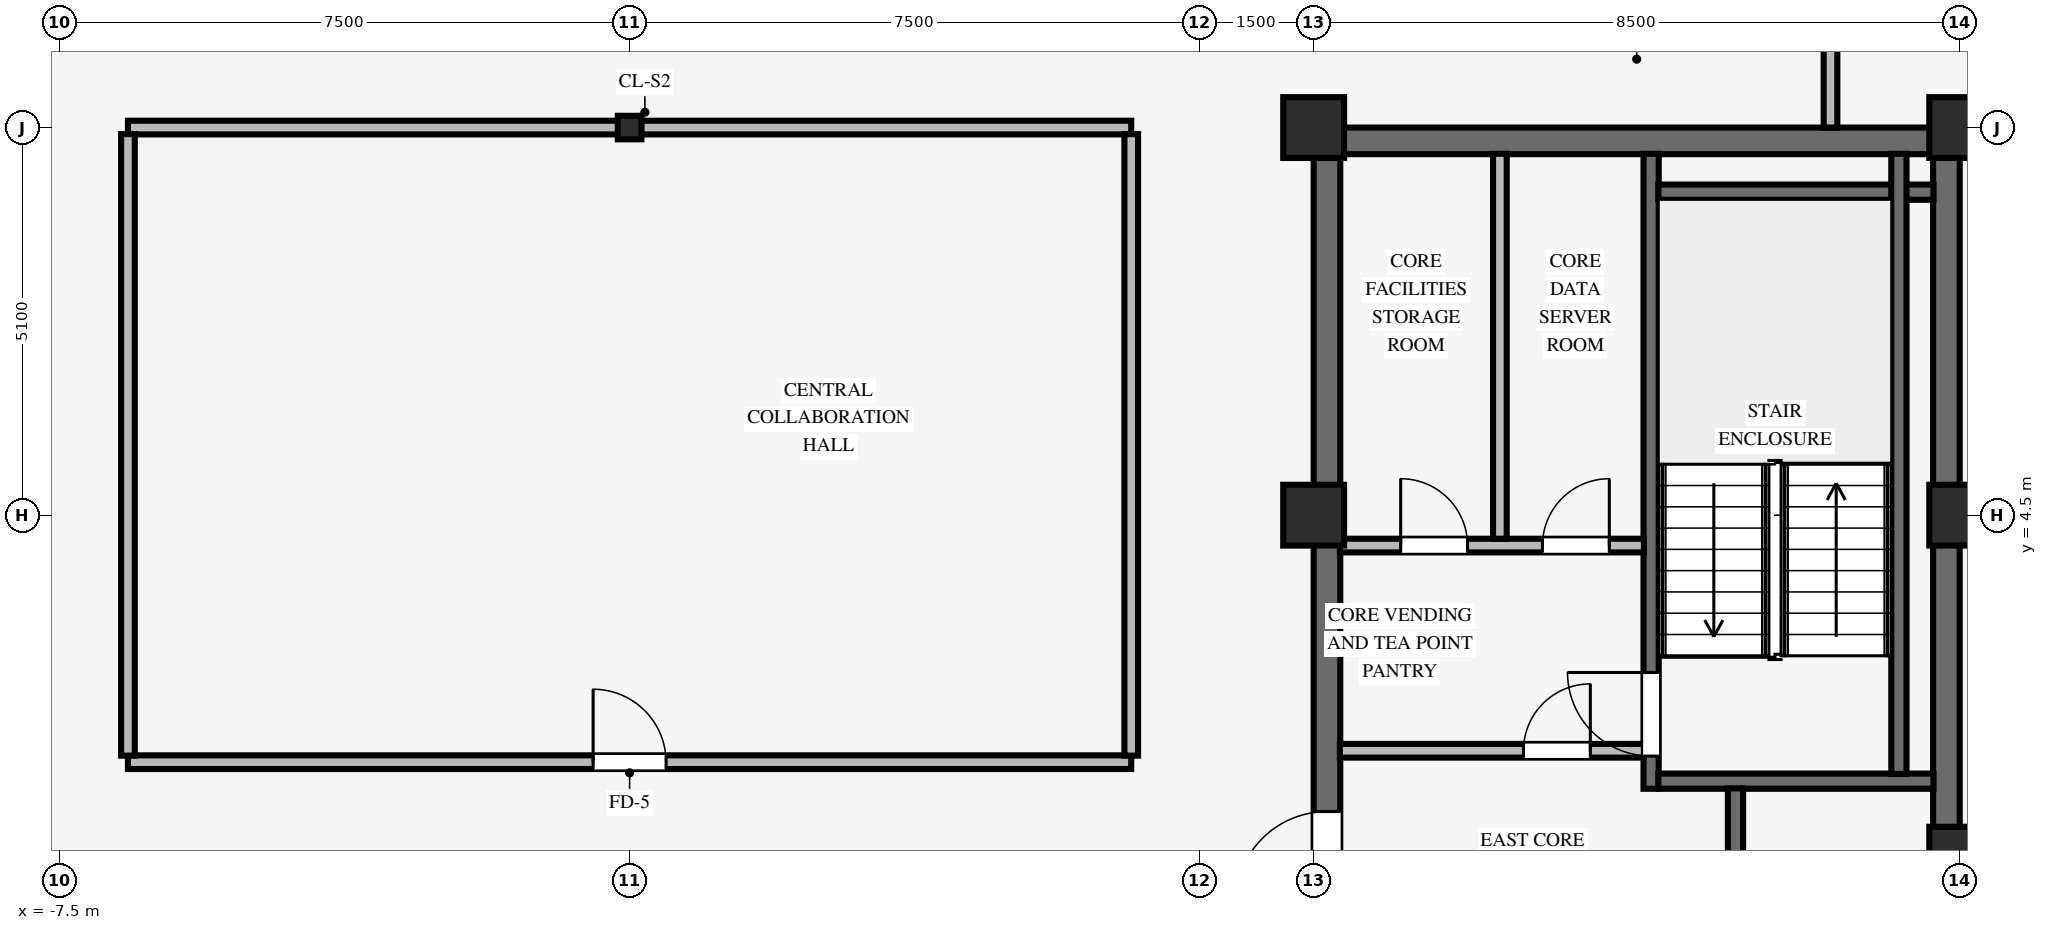
"""IFC4 building model, lengths in metres.
Left out: names, types, materials, properties, quantities, classifications, styles, units other than length and angle.
Written with IfcOpenShell. Run it as: python <this file> out.ifc"""

import sys

from ifc_helpers import new_model, si_unit, direction, frame, frame_2d, origin, origin_2d, place, context, subcontext, project, spatial, rectangle, i_section, extrude, source, transform, mapped, element, fill, save


model = new_model("IFC4")
c1 = context("Model", 3, precision=1e-05, world=origin(), true_north=direction((0.0, 1.0)))
c2 = subcontext(c1, "Body", "Model", "MODEL_VIEW")
j1 = project(units=[si_unit("LENGTHUNIT", "METRE"), si_unit("PLANEANGLEUNIT", "RADIAN")], contexts=[c1])
p1 = place(None, origin())
s1 = spatial("IfcSite", under=j1, at=p1, CompositionType="ELEMENT")
p2 = place(p1, origin())
s2 = spatial("IfcBuilding", under=s1, at=p2, CompositionType="ELEMENT")
p3 = place(p2, frame((0.0, 0.0, 238.35)))
s3 = spatial("IfcBuildingStorey", under=s2, at=p3, CompositionType="ELEMENT", Elevation=238.35)
p4 = place(p3, frame((9.0, 9.425, 0.0), z_axis=(0.0, 0.0, 1.0), x_axis=(1.0, 0.0, 0.0)))
e1 = element("IfcWall", 1, at=p4, inside=s3, PredefinedType="SHEAR", context=c2, shape_type="SweptSolid", body=[
    extrude(rectangle(XDim=8.5, YDim=0.35, at=frame_2d((4.25, 0.0))), origin(), (0.0, 0.0, 1.0), 3.37),
])
p5 = place(p3, frame((9.175, -9.255, 0.0), z_axis=(0.0, 0.0, 1.0), x_axis=(0.0, 1.0, 0.0)))
e2 = element("IfcWall", 2, at=p5, inside=s3, PredefinedType="SHEAR", context=c2, shape_type="SweptSolid", body=[
    extrude(rectangle(XDim=18.51, YDim=0.35, at=frame_2d((9.255, 0.0))), origin(), (0.0, 0.0, 1.0), 3.37),
])
p6 = place(p5, frame((8.655, 0.0, 0.0)))
e3 = element("IfcOpeningElement", 3, at=p6, cuts=e2, PredefinedType="OPENING", context=c2, shape_type="SweptSolid", body=[
    extrude(rectangle(XDim=1.2, YDim=2.15, at=frame_2d((0.6, 1.075))), frame((0.0, 0.185, 0.0), z_axis=(0.0, -1.0, 0.0), x_axis=(1.0, 0.0, 0.0)), (0.0, 0.0, 1.0), 0.37),
])
p7 = place(p3, frame((17.325, -9.255, 0.0), z_axis=(0.0, 0.0, 1.0), x_axis=(0.0, 1.0, 0.0)))
e4 = element("IfcWall", 4, at=p7, inside=s3, PredefinedType="SHEAR", context=c2, shape_type="SweptSolid", body=[
    extrude(rectangle(XDim=18.51, YDim=0.35, at=frame_2d((9.255, 0.0))), origin(), (0.0, 0.0, 1.0), 3.37),
])
for number, where, z_axis, x_axis in (
    (5, (9.0, 4.5, 0.0), (0.0, 0.0, 1.0), (1.0, 0.0, 0.0)),
    (6, (9.0, 9.6, 0.0), (0.0, 0.0, 1.0), (1.0, 0.0, 0.0)),
    (7, (17.5, 4.5, 0.0), (0.0, 0.0, 1.0), (1.0, 0.0, 0.0)),
    (8, (17.5, 9.6, 0.0), (0.0, 0.0, 1.0), (1.0, 0.0, 0.0)),
    (9, (17.5, 0.0, 0.0), (0.0, 0.0, 1.0), (1.0, 0.0, 0.0)),
):
    element("IfcColumn", number, at=place(p3, frame(where, z_axis=z_axis, x_axis=x_axis)), inside=s3, PredefinedType="COLUMN", context=c2, shape_type="SweptSolid", body=[
        extrude(rectangle(XDim=0.8, YDim=0.8, at=origin_2d()), origin(), (0.0, 0.0, 1.0), 3.37),
    ])
p8 = place(p3, frame((0.0, 9.6, 0.0), z_axis=(0.0, 0.0, 1.0), x_axis=(1.0, 0.0, 0.0)))
e10 = element("IfcColumn", 10, at=p8, inside=s3, PredefinedType="COLUMN", context=c2, shape_type="SweptSolid", body=[
    extrude(i_section(OverallWidth=0.31, OverallDepth=0.31, WebThickness=0.015, FlangeThickness=0.015, FilletRadius=0.015, at=origin_2d()), origin(), (0.0, 0.0, 1.0), 3.37),
])
p9 = place(p3, frame((13.44, 0.9, 0.0), z_axis=(0.0, 0.0, 1.0), x_axis=(0.0, 1.0, 0.0)))
e11 = element("IfcWall", 11, at=p9, inside=s3, PredefinedType="SHEAR", context=c2, shape_type="SweptSolid", body=[
    extrude(rectangle(XDim=8.355, YDim=0.2, at=frame_2d((4.177, 0.0))), origin(), (0.0, 0.0, 1.0), 3.37),
])
p10 = place(p9, frame((0.43, 0.0, 0.0)))
e12 = element("IfcOpeningElement", 12, at=p10, cuts=e11, PredefinedType="OPENING", context=c2, shape_type="SweptSolid", body=[
    extrude(rectangle(XDim=1.1, YDim=2.15, at=frame_2d((0.55, 1.075))), frame((0.0, 0.11, 0.0), z_axis=(0.0, -1.0, 0.0), x_axis=(1.0, 0.0, 0.0)), (0.0, 0.0, 1.0), 0.22),
])
for number, where, z_axis, x_axis in (
    (13, (13.535, 1.0, 0.0), (0.0, 0.0, 1.0), (1.0, 0.0, 0.0)),
    (14, (13.535, 8.75, 0.0), (0.0, 0.0, 1.0), (1.0, 0.0, 0.0)),
):
    element("IfcWall", number, at=place(p3, frame(where, z_axis=z_axis, x_axis=x_axis)), inside=s3, PredefinedType="SHEAR", context=c2, shape_type="SweptSolid", body=[
        extrude(rectangle(XDim=3.62, YDim=0.2, at=frame_2d((1.81, 0.0))), origin(), (0.0, 0.0, 1.0), 3.37),
    ])
p11 = place(p3, frame((16.7, 1.095, 0.0), z_axis=(0.0, 0.0, 1.0), x_axis=(0.0, 1.0, 0.0)))
e15 = element("IfcWall", 15, at=p11, inside=s3, PredefinedType="SHEAR", context=c2, shape_type="SweptSolid", body=[
    extrude(rectangle(XDim=8.16, YDim=0.2, at=frame_2d((4.08, 0.0))), origin(), (0.0, 0.0, 1.0), 3.37),
])
p12 = place(p3, frame((14.55, -9.255, 0.0), z_axis=(0.0, 0.0, 1.0), x_axis=(0.0, 1.0, 0.0)))
e16 = element("IfcWall", 16, at=p12, inside=s3, PredefinedType="SHEAR", context=c2, shape_type="SweptSolid", body=[
    extrude(rectangle(XDim=10.16, YDim=0.2, at=frame_2d((5.08, 0.0))), origin(), (0.0, 0.0, 1.0), 3.37),
])
p13 = place(p12, frame((6.615, 0.0, 0.0)))
e17 = element("IfcOpeningElement", 17, at=p13, cuts=e16, PredefinedType="OPENING", context=c2, shape_type="SweptSolid", body=[
    extrude(rectangle(XDim=0.88, YDim=2.1, at=frame_2d((0.44, 1.05))), frame((0.0, 0.11, 0.0), z_axis=(0.0, -1.0, 0.0), x_axis=(1.0, 0.0, 0.0)), (0.0, 0.0, 1.0), 0.22),
])
p14 = place(p12, frame((0.98, 0.0, 0.0)))
e18 = element("IfcOpeningElement", 18, at=p14, cuts=e16, PredefinedType="OPENING", context=c2, shape_type="SweptSolid", body=[
    extrude(rectangle(XDim=1.15, YDim=2.15, at=frame_2d((0.575, 1.075))), frame((0.0, 0.11, 0.0), z_axis=(0.0, -1.0, 0.0), x_axis=(1.0, 0.0, 0.0)), (0.0, 0.0, 1.0), 0.22),
])
p15 = place(p3, frame((9.345, 1.4, 0.0), z_axis=(0.0, 0.0, 1.0), x_axis=(1.0, 0.0, 0.0)))
e19 = element("IfcWall", 19, at=p15, inside=s3, PredefinedType="PARTITIONING", context=c2, shape_type="SweptSolid", body=[
    extrude(rectangle(XDim=4.0, YDim=0.18, at=frame_2d((2.0, 0.0))), origin(), (0.0, 0.0, 1.0), 3.36),
])
p16 = place(p15, frame((2.415, 0.0, 0.0)))
e20 = element("IfcOpeningElement", 20, at=p16, cuts=e19, PredefinedType="OPENING", context=c2, shape_type="SweptSolid", body=[
    extrude(rectangle(XDim=0.88, YDim=2.1, at=frame_2d((0.44, 1.05))), frame((0.0, 0.1, 0.0), z_axis=(0.0, -1.0, 0.0), x_axis=(1.0, 0.0, 0.0)), (0.0, 0.0, 1.0), 0.2),
])
p17 = place(p3, frame((9.345, 4.1, 0.0), z_axis=(0.0, 0.0, 1.0), x_axis=(1.0, 0.0, 0.0)))
e21 = element("IfcWall", 21, at=p17, inside=s3, PredefinedType="PARTITIONING", context=c2, shape_type="SweptSolid", body=[
    extrude(rectangle(XDim=4.0, YDim=0.18, at=frame_2d((2.0, 0.0))), origin(), (0.0, 0.0, 1.0), 3.36),
])
p18 = place(p17, frame((0.8, 0.0, 0.0)))
e22 = element("IfcOpeningElement", 22, at=p18, cuts=e21, PredefinedType="OPENING", context=c2, shape_type="SweptSolid", body=[
    extrude(rectangle(XDim=0.88, YDim=2.1, at=frame_2d((0.44, 1.05))), frame((0.0, 0.1, 0.0), z_axis=(0.0, -1.0, 0.0), x_axis=(1.0, 0.0, 0.0)), (0.0, 0.0, 1.0), 0.2),
])
p19 = place(p17, frame((2.665, 0.0, 0.0)))
e23 = element("IfcOpeningElement", 23, at=p19, cuts=e21, PredefinedType="OPENING", context=c2, shape_type="SweptSolid", body=[
    extrude(rectangle(XDim=0.88, YDim=2.1, at=frame_2d((0.44, 1.05))), frame((0.0, 0.1, 0.0), z_axis=(0.0, -1.0, 0.0), x_axis=(1.0, 0.0, 0.0)), (0.0, 0.0, 1.0), 0.2),
])
p20 = place(p3, frame((11.45, 4.19, 0.0), z_axis=(0.0, 0.0, 1.0), x_axis=(0.0, 1.0, 0.0)))
e24 = element("IfcWall", 24, at=p20, inside=s3, PredefinedType="PARTITIONING", context=c2, shape_type="SweptSolid", body=[
    extrude(rectangle(XDim=5.065, YDim=0.18, at=frame_2d((2.532, 0.0))), origin(), (0.0, 0.0, 1.0), 3.36),
])
p21 = place(p3, frame((-6.6, 1.25, 0.0), z_axis=(0.0, 0.0, 1.0), x_axis=(1.0, 0.0, 0.0)))
e25 = element("IfcWall", 25, at=p21, inside=s3, PredefinedType="PARTITIONING", context=c2, shape_type="SweptSolid", body=[
    extrude(rectangle(XDim=13.2, YDim=0.18, at=frame_2d((6.6, 0.0))), origin(), (0.0, 0.0, 1.0), 3.36),
])
p22 = place(p21, frame((6.12, 0.0, 0.0)))
e26 = element("IfcOpeningElement", 26, at=p22, cuts=e25, PredefinedType="OPENING", context=c2, shape_type="SweptSolid", body=[
    extrude(rectangle(XDim=0.96, YDim=2.1, at=frame_2d((0.48, 1.05))), frame((0.0, 0.1, 0.0), z_axis=(0.0, -1.0, 0.0), x_axis=(1.0, 0.0, 0.0)), (0.0, 0.0, 1.0), 0.2),
])
for number, where, z_axis, x_axis in (
    (27, (-6.6, 9.6, 0.0), (0.0, 0.0, 1.0), (1.0, 0.0, 0.0)),
    (28, (0.151, 9.6, 0.0), (0.0, 0.0, 1.0), (1.0, 0.0, 0.0)),
):
    element("IfcWall", number, at=place(p3, frame(where, z_axis=z_axis, x_axis=x_axis)), inside=s3, PredefinedType="PARTITIONING", context=c2, shape_type="SweptSolid", body=[
        extrude(rectangle(XDim=6.449, YDim=0.18, at=frame_2d((3.225, 0.0))), origin(), (0.0, 0.0, 1.0), 2.405),
    ])
for number, where, z_axis, x_axis in (
    (29, (-6.6, 1.336, 0.0), (0.0, 0.0, 1.0), (0.0, 1.0, 0.0)),
    (30, (6.6, 1.336, 0.0), (0.0, 0.0, 1.0), (0.0, 1.0, 0.0)),
):
    element("IfcWall", number, at=place(p3, frame(where, z_axis=z_axis, x_axis=x_axis)), inside=s3, PredefinedType="PARTITIONING", context=c2, shape_type="SweptSolid", body=[
        extrude(rectangle(XDim=8.178, YDim=0.18, at=frame_2d((4.089, 0.0))), origin(), (0.0, 0.0, 1.0), 3.36),
    ])
p23 = place(p3, frame((15.8, 9.6, 0.0), z_axis=(0.0, 0.0, 1.0), x_axis=(0.0, 1.0, 0.0)))
e31 = element("IfcWall", 31, at=p23, inside=s3, PredefinedType="PARTITIONING", context=c2, shape_type="SweptSolid", body=[
    extrude(rectangle(XDim=2.514, YDim=0.18, at=frame_2d((1.257, 0.0))), origin(), (0.0, 0.0, 1.0), 3.36),
])
m1 = source(origin(), c2, "Body", "SweptSolid", [
    extrude(rectangle(XDim=1.1, YDim=2.15, at=frame_2d((0.55, 1.075))), frame((0.0, 0.025, 0.0), z_axis=(0.0, -1.0, 0.0), x_axis=(1.0, 0.0, 0.0)), (0.0, 0.0, 1.0), 0.05),
])
p24 = place(p10, origin())
e32 = element("IfcDoor", 32, at=p24, inside=s3, OperationType="SINGLE_SWING_RIGHT", PredefinedType="DOOR", context=c2, shape_type="MappedRepresentation", body=[
    mapped(m1, transform((0.0, 0.0, 0.0), scale=1.0)),
])
fill(e12, e32)
m2 = source(origin(), c2, "Body", "SweptSolid", [
    extrude(rectangle(XDim=1.2, YDim=2.15, at=frame_2d((0.6, 1.075))), frame((0.0, 0.025, 0.0), z_axis=(0.0, -1.0, 0.0), x_axis=(1.0, 0.0, 0.0)), (0.0, 0.0, 1.0), 0.05),
])
p25 = place(p6, origin())
e33 = element("IfcDoor", 33, at=p25, inside=s3, OperationType="SINGLE_SWING_LEFT", PredefinedType="DOOR", context=c2, shape_type="MappedRepresentation", body=[
    mapped(m2, transform((0.0, 0.0, 0.0), scale=1.0)),
])
fill(e3, e33)
m3 = source(origin(), c2, "Body", "SweptSolid", [
    extrude(rectangle(XDim=0.88, YDim=2.1, at=frame_2d((0.44, 1.05))), frame((0.0, 0.025, 0.0), z_axis=(0.0, -1.0, 0.0), x_axis=(1.0, 0.0, 0.0)), (0.0, 0.0, 1.0), 0.05),
])
p26 = place(p16, origin())
e34 = element("IfcDoor", 34, at=p26, inside=s3, OperationType="SINGLE_SWING_RIGHT", PredefinedType="DOOR", context=c2, shape_type="MappedRepresentation", body=[
    mapped(m3, transform((0.0, 0.0, 0.0), scale=1.0)),
])
fill(e20, e34)
p27 = place(p18, origin())
e35 = element("IfcDoor", 35, at=p27, inside=s3, OperationType="SINGLE_SWING_LEFT", PredefinedType="DOOR", context=c2, shape_type="MappedRepresentation", body=[
    mapped(m3, transform((0.0, 0.0, 0.0), scale=1.0)),
])
fill(e22, e35)
p28 = place(p19, origin())
e36 = element("IfcDoor", 36, at=p28, inside=s3, OperationType="SINGLE_SWING_RIGHT", PredefinedType="DOOR", context=c2, shape_type="MappedRepresentation", body=[
    mapped(m3, transform((0.0, 0.0, 0.0), scale=1.0)),
])
fill(e23, e36)
m4 = source(origin(), c2, "Body", "SweptSolid", [
    extrude(rectangle(XDim=0.96, YDim=2.1, at=frame_2d((0.48, 1.05))), frame((0.0, 0.025, 0.0), z_axis=(0.0, -1.0, 0.0), x_axis=(1.0, 0.0, 0.0)), (0.0, 0.0, 1.0), 0.05),
])
p29 = place(p22, origin())
e37 = element("IfcDoor", 37, at=p29, inside=s3, OperationType="SINGLE_SWING_LEFT", PredefinedType="DOOR", context=c2, shape_type="MappedRepresentation", body=[
    mapped(m4, transform((0.0, 0.0, 0.0), scale=1.0)),
])
fill(e26, e37)
save(model, sys.argv[1])
